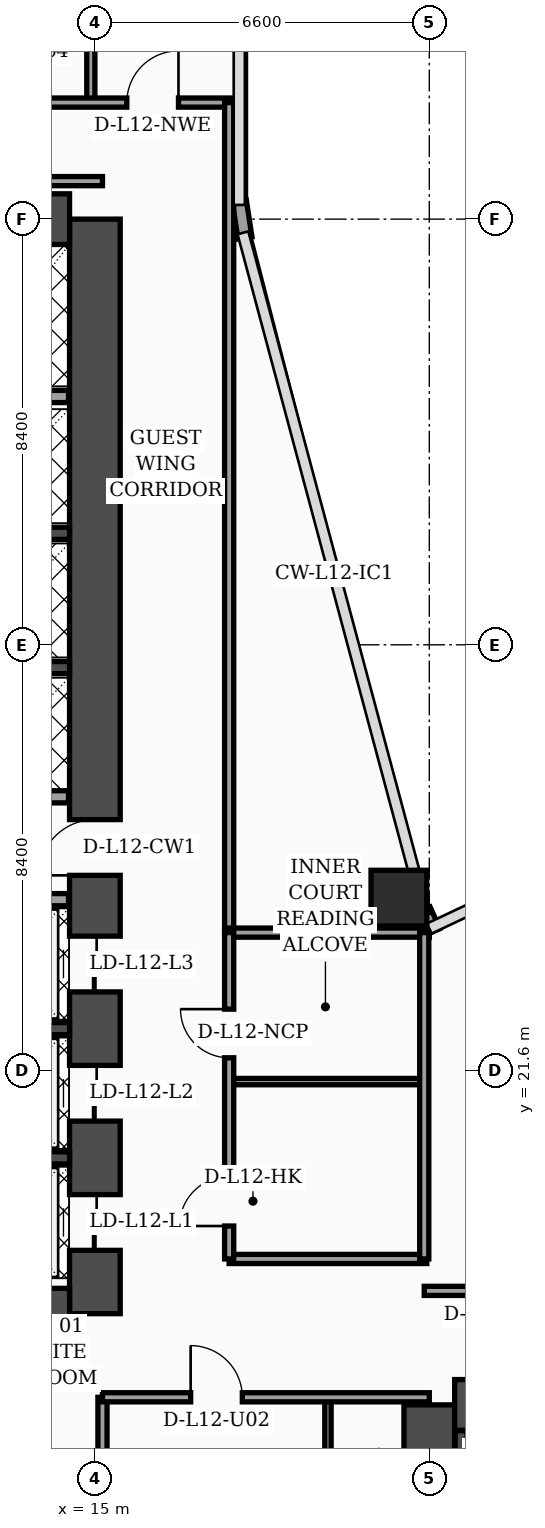
"""IFC4 building model, lengths in metres.
Left out: names, types, materials, properties, quantities, classifications, styles, units other than length and angle.
Written with IfcOpenShell. Run it as: python <this file> out.ifc"""

import sys

from ifc_helpers import new_model, si_unit, direction, frame, frame_2d, origin, origin_2d, place, context, subcontext, project, spatial, rectangle, hollow_rectangle, extrude, element, fill, save


model = new_model("IFC4")
c1 = context("Model", 3, precision=1e-05, world=origin(), true_north=direction((0.0, 1.0)))
c2 = subcontext(c1, "Body", "Model", "MODEL_VIEW")
j1 = project(units=[si_unit("LENGTHUNIT", "METRE"), si_unit("PLANEANGLEUNIT", "RADIAN")], contexts=[c1])
p1 = place(None, origin())
s1 = spatial("IfcSite", under=j1, at=p1, CompositionType="ELEMENT")
p2 = place(p1, origin())
s2 = spatial("IfcBuilding", under=s1, at=p2, CompositionType="ELEMENT")
p3 = place(p2, frame((0.0, 0.0, 54.6)))
s3 = spatial("IfcBuildingStorey", under=s2, at=p3, CompositionType="ELEMENT", Elevation=54.6)
p4 = place(p3, frame((15.0, 16.8, 0.0), z_axis=(0.0, 0.0, 1.0), x_axis=(0.0, 1.0, 0.0)))
e1 = element("IfcWall", 1, at=p4, inside=s3, PredefinedType="SHEAR", context=c2, shape_type="SweptSolid", body=[
    extrude(rectangle(XDim=21.6, YDim=1.0, at=frame_2d((10.8, 0.0))), origin(), (0.0, 0.0, 1.0), 3.56),
])
p5 = place(p4, frame((8.65, 0.0, 0.0)))
e2 = element("IfcOpeningElement", 2, at=p5, cuts=e1, PredefinedType="OPENING", context=c2, shape_type="SweptSolid", body=[
    extrude(rectangle(XDim=1.1, YDim=2.2, at=frame_2d((0.55, 1.1))), frame((0.0, 0.51, 0.0), z_axis=(0.0, -1.0, 0.0), x_axis=(1.0, 0.0, 0.0)), (0.0, 0.0, 1.0), 1.02),
])
p6 = place(p4, frame((1.25, 0.0, 0.0)))
e3 = element("IfcOpeningElement", 3, at=p6, cuts=e1, PredefinedType="OPENING", context=c2, shape_type="SweptSolid", body=[
    extrude(rectangle(XDim=1.1, YDim=2.2, at=frame_2d((0.55, 1.1))), frame((0.0, 0.51, 0.0), z_axis=(0.0, -1.0, 0.0), x_axis=(1.0, 0.0, 0.0)), (0.0, 0.0, 1.0), 1.02),
])
p7 = place(p4, frame((3.8, 0.0, 0.0)))
e4 = element("IfcOpeningElement", 4, at=p7, cuts=e1, PredefinedType="OPENING", context=c2, shape_type="SweptSolid", body=[
    extrude(rectangle(XDim=1.1, YDim=2.2, at=frame_2d((0.55, 1.1))), frame((0.0, 0.51, 0.0), z_axis=(0.0, -1.0, 0.0), x_axis=(1.0, 0.0, 0.0)), (0.0, 0.0, 1.0), 1.02),
])
p8 = place(p4, frame((6.35, 0.0, 0.0)))
e5 = element("IfcOpeningElement", 5, at=p8, cuts=e1, PredefinedType="OPENING", context=c2, shape_type="SweptSolid", body=[
    extrude(rectangle(XDim=1.1, YDim=2.2, at=frame_2d((0.55, 1.1))), frame((0.0, 0.51, 0.0), z_axis=(0.0, -1.0, 0.0), x_axis=(1.0, 0.0, 0.0)), (0.0, 0.0, 1.0), 1.02),
])
for number, where, z_axis, x_axis in (
    (6, (4.7, 38.4, 0.0), (0.0, 0.0, 1.0), (1.0, 0.0, 0.0)),
    (7, (4.7, 16.8, 0.0), (0.0, 0.0, 1.0), (1.0, 0.0, 0.0)),
):
    element("IfcWall", number, at=place(p3, frame(where, z_axis=z_axis, x_axis=x_axis)), inside=s3, PredefinedType="SHEAR", context=c2, shape_type="SweptSolid", body=[
        extrude(rectangle(XDim=9.8, YDim=1.0, at=frame_2d((4.9, 0.0))), origin(), (0.0, 0.0, 1.0), 3.56),
    ])
p9 = place(p3, frame((21.6, 4.6, 0.0), z_axis=(0.0, 0.0, 1.0), x_axis=(0.0, 1.0, 0.0)))
e8 = element("IfcWall", 8, at=p9, inside=s3, PredefinedType="SHEAR", context=c2, shape_type="SweptSolid", body=[
    extrude(rectangle(XDim=10.4, YDim=1.0, at=frame_2d((5.2, 0.0))), origin(), (0.0, 0.0, 1.0), 3.56),
])
p10 = place(p3, frame((22.1, 15.0, 0.0), z_axis=(0.0, 0.0, 1.0), x_axis=(1.0, 0.0, 0.0)))
e9 = element("IfcWall", 9, at=p10, inside=s3, PredefinedType="SHEAR", context=c2, shape_type="SweptSolid", body=[
    extrude(rectangle(XDim=9.8, YDim=1.0, at=frame_2d((4.9, 0.0))), origin(), (0.0, 0.0, 1.0), 3.56),
])
p11 = place(p10, frame((4.8, 0.0, 0.0)))
e10 = element("IfcOpeningElement", 10, at=p11, cuts=e9, PredefinedType="OPENING", context=c2, shape_type="SweptSolid", body=[
    extrude(rectangle(XDim=1.1, YDim=2.2, at=frame_2d((0.55, 1.1))), frame((0.0, 0.51, 0.0), z_axis=(0.0, -1.0, 0.0), x_axis=(1.0, 0.0, 0.0)), (0.0, 0.0, 1.0), 1.02),
])
p12 = place(p3, frame((22.23, 5.1, 0.0), z_axis=(0.0, 0.0, 1.0), x_axis=(0.0, 1.0, 0.0)))
e11 = element("IfcWall", 11, at=p12, inside=s3, PredefinedType="SOLIDWALL", context=c2, shape_type="SweptSolid", body=[
    extrude(rectangle(XDim=9.39, YDim=0.24, at=frame_2d((4.695, 0.0))), origin(), (0.0, 0.0, 1.0), 3.56),
])
for number, where, z_axis, x_axis in (
    (12, (12.18, 19.875, 0.0), (0.0, 0.0, 1.0), (1.0, 0.0, 0.0)),
    (13, (12.18, 22.425, 0.0), (0.0, 0.0, 1.0), (1.0, 0.0, 0.0)),
    (14, (12.18, 29.55, 0.0), (0.0, 0.0, 1.0), (1.0, 0.0, 0.0)),
    (15, (12.18, 32.2, 0.0), (0.0, 0.0, 1.0), (1.0, 0.0, 0.0)),
):
    element("IfcWall", number, at=place(p3, frame(where, z_axis=z_axis, x_axis=x_axis)), inside=s3, PredefinedType="SOLIDWALL", context=c2, shape_type="SweptSolid", body=[
        extrude(rectangle(XDim=2.32, YDim=0.24, at=frame_2d((1.16, 0.0))), origin(), (0.0, 0.0, 1.0), 3.56),
    ])
p13 = place(p3, frame((21.0, 25.0, 0.0), z_axis=(0.0, 0.0, 1.0), x_axis=(1.0, 0.0, 0.0)))
e16 = element("IfcColumn", 16, at=p13, inside=s3, PredefinedType="COLUMN", context=c2, shape_type="SweptSolid", body=[
    extrude(hollow_rectangle(XDim=1.1, YDim=1.1, WallThickness=0.045, at=origin_2d()), origin(), (0.0, 0.0, 1.0), 3.56),
])
p14 = place(p3, frame((21.68, 24.34, 0.0), z_axis=(0.0, 0.0, 1.0), x_axis=(-0.40758134973, 0.913168901875, 0.0)))
e17 = element("IfcWall", 17, at=p14, inside=s3, PredefinedType="SOLIDWALL", context=c2, shape_type="SweptSolid", body=[
    extrude(rectangle(XDim=0.471, YDim=0.28, at=frame_2d((0.235, 0.0))), origin(), (0.0, 0.0, 1.0), 3.56),
])
p15 = place(p3, frame((17.962, 38.03, 0.0), z_axis=(0.0, 0.0, 1.0), x_axis=(-0.15141125477, 0.988470855377, 0.0)))
e18 = element("IfcWall", 18, at=p15, inside=s3, PredefinedType="SOLIDWALL", context=c2, shape_type="SweptSolid", body=[
    extrude(rectangle(XDim=0.739, YDim=0.28, at=frame_2d((0.369, 0.0))), origin(), (0.0, 0.0, 1.0), 3.56),
])
p16 = place(p3, frame((12.15, 24.97, 0.0), z_axis=(0.0, 0.0, 1.0), x_axis=(1.0, 0.0, 0.0)))
e19 = element("IfcWall", 19, at=p16, inside=s3, PredefinedType="SOLIDWALL", context=c2, shape_type="SweptSolid", body=[
    extrude(rectangle(XDim=2.33, YDim=0.24, at=frame_2d((1.165, 0.0))), origin(), (0.0, 0.0, 1.0), 2.84),
])
p17 = place(p3, frame((12.25, 27.0, 0.0), z_axis=(0.0, 0.0, 1.0), x_axis=(1.0, 0.0, 0.0)))
e20 = element("IfcWall", 20, at=p17, inside=s3, PredefinedType="SOLIDWALL", context=c2, shape_type="SweptSolid", body=[
    extrude(rectangle(XDim=2.23, YDim=0.24, at=frame_2d((1.115, 0.0))), origin(), (0.0, 0.0, 1.0), 3.56),
])
p18 = place(p3, frame((9.66, 34.9, 0.0), z_axis=(0.0, 0.0, 1.0), x_axis=(1.0, 0.0, 0.0)))
e21 = element("IfcWall", 21, at=p18, inside=s3, PredefinedType="SOLIDWALL", context=c2, shape_type="SweptSolid", body=[
    extrude(rectangle(XDim=4.82, YDim=0.24, at=frame_2d((2.41, 0.0))), origin(), (0.0, 0.0, 1.0), 3.56),
])
p19 = place(p3, frame((15.15, 2.44, 0.0), z_axis=(0.0, 0.0, 1.0), x_axis=(0.0, 1.0, 0.0)))
e22 = element("IfcWall", 22, at=p19, inside=s3, PredefinedType="PARTITIONING", context=c2, shape_type="SweptSolid", body=[
    extrude(rectangle(XDim=12.71, YDim=0.18, at=frame_2d((6.355, 0.0))), origin(), (0.0, 0.0, 1.0), 3.04),
])
p20 = place(p3, frame((19.6, 2.44, 0.0), z_axis=(0.0, 0.0, 1.0), x_axis=(0.0, 1.0, 0.0)))
e23 = element("IfcWall", 23, at=p20, inside=s3, PredefinedType="PARTITIONING", context=c2, shape_type="SweptSolid", body=[
    extrude(rectangle(XDim=12.71, YDim=0.125, at=frame_2d((6.355, 0.0))), origin(), (0.0, 0.0, 1.0), 2.34),
])
p21 = place(p20, frame((4.34, 0.0, 0.0)))
e24 = element("IfcOpeningElement", 24, at=p21, cuts=e23, PredefinedType="OPENING", context=c2, shape_type="SweptSolid", body=[
    extrude(rectangle(XDim=0.96, YDim=2.2, at=frame_2d((0.48, 1.1))), frame((0.0, 0.073, 0.0), z_axis=(0.0, -1.0, 0.0), x_axis=(1.0, 0.0, 0.0)), (0.0, 0.0, 1.0), 0.145),
])
p22 = place(p20, frame((10.18, 0.0, 0.0)))
e25 = element("IfcOpeningElement", 25, at=p22, cuts=e23, PredefinedType="OPENING", context=c2, shape_type="SweptSolid", body=[
    extrude(rectangle(XDim=0.9, YDim=2.15, at=frame_2d((0.45, 1.075))), frame((0.0, 0.073, 0.0), z_axis=(0.0, -1.0, 0.0), x_axis=(1.0, 0.0, 0.0)), (0.0, 0.0, 1.0), 0.145),
])
p23 = place(p3, frame((15.15, 15.15, 0.0), z_axis=(0.0, 0.0, 1.0), x_axis=(1.0, 0.0, 0.0)))
e26 = element("IfcWall", 26, at=p23, inside=s3, PredefinedType="PARTITIONING", context=c2, shape_type="SweptSolid", body=[
    extrude(rectangle(XDim=6.45, YDim=0.18, at=frame_2d((3.225, 0.0))), origin(), (0.0, 0.0, 1.0), 2.34),
])
p24 = place(p23, frame((1.74, 0.0, 0.0)))
e27 = element("IfcOpeningElement", 27, at=p24, cuts=e26, PredefinedType="OPENING", context=c2, shape_type="SweptSolid", body=[
    extrude(rectangle(XDim=1.02, YDim=2.2, at=frame_2d((0.51, 1.1))), frame((0.0, 0.1, 0.0), z_axis=(0.0, -1.0, 0.0), x_axis=(1.0, 0.0, 0.0)), (0.0, 0.0, 1.0), 0.2),
])
p25 = place(p3, frame((14.92, 40.7, 0.0), z_axis=(0.0, 0.0, 1.0), x_axis=(0.0, 1.0, 0.0)))
e28 = element("IfcWall", 28, at=p25, inside=s3, PredefinedType="PARTITIONING", context=c2, shape_type="SweptSolid", body=[
    extrude(rectangle(XDim=7.1, YDim=0.16, at=frame_2d((3.55, 0.0))), origin(), (0.0, 0.0, 1.0), 3.04),
])
p26 = place(p3, frame((0.08, 40.7, 0.0), z_axis=(0.0, 0.0, 1.0), x_axis=(1.0, 0.0, 0.0)))
e29 = element("IfcWall", 29, at=p26, inside=s3, PredefinedType="PARTITIONING", context=c2, shape_type="SweptSolid", body=[
    extrude(rectangle(XDim=17.77, YDim=0.18, at=frame_2d((8.885, 0.0))), origin(), (0.0, 0.0, 1.0), 2.84),
])
p27 = place(p26, frame((0.9, 0.0, 0.0)))
e30 = element("IfcOpeningElement", 30, at=p27, cuts=e29, PredefinedType="OPENING", context=c2, shape_type="SweptSolid", body=[
    extrude(rectangle(XDim=1.02, YDim=2.2, at=frame_2d((0.51, 1.1))), frame((0.0, 0.1, 0.0), z_axis=(0.0, -1.0, 0.0), x_axis=(1.0, 0.0, 0.0)), (0.0, 0.0, 1.0), 0.2),
])
p28 = place(p26, frame((4.9, 0.0, 0.0)))
e31 = element("IfcOpeningElement", 31, at=p28, cuts=e29, PredefinedType="OPENING", context=c2, shape_type="SweptSolid", body=[
    extrude(rectangle(XDim=1.02, YDim=2.2, at=frame_2d((0.51, 1.1))), frame((0.0, 0.1, 0.0), z_axis=(0.0, -1.0, 0.0), x_axis=(1.0, 0.0, 0.0)), (0.0, 0.0, 1.0), 0.2),
])
p29 = place(p26, frame((10.78, 0.0, 0.0)))
e32 = element("IfcOpeningElement", 32, at=p29, cuts=e29, PredefinedType="OPENING", context=c2, shape_type="SweptSolid", body=[
    extrude(rectangle(XDim=1.02, YDim=2.2, at=frame_2d((0.51, 1.1))), frame((0.0, 0.1, 0.0), z_axis=(0.0, -1.0, 0.0), x_axis=(1.0, 0.0, 0.0)), (0.0, 0.0, 1.0), 0.2),
])
p30 = place(p26, frame((15.55, 0.0, 0.0)))
e33 = element("IfcOpeningElement", 33, at=p30, cuts=e29, PredefinedType="OPENING", context=c2, shape_type="SweptSolid", body=[
    extrude(rectangle(XDim=1.02, YDim=2.2, at=frame_2d((0.51, 1.1))), frame((0.0, 0.1, 0.0), z_axis=(0.0, -1.0, 0.0), x_axis=(1.0, 0.0, 0.0)), (0.0, 0.0, 1.0), 0.2),
])
p31 = place(p3, frame((17.65, 24.3, 0.0), z_axis=(0.0, 0.0, 1.0), x_axis=(0.0, 1.0, 0.0)))
e34 = element("IfcWall", 34, at=p31, inside=s3, PredefinedType="PARTITIONING", context=c2, shape_type="SweptSolid", body=[
    extrude(rectangle(XDim=16.4, YDim=0.18, at=frame_2d((8.2, 0.0))), origin(), (0.0, 0.0, 1.0), 2.84),
])
p32 = place(p3, frame((3.68, 39.15, 0.0), z_axis=(0.0, 0.0, 1.0), x_axis=(1.0, 0.0, 0.0)))
e35 = element("IfcWall", 35, at=p32, inside=s3, PredefinedType="PARTITIONING", context=c2, shape_type="SweptSolid", body=[
    extrude(rectangle(XDim=11.47, YDim=0.18, at=frame_2d((5.735, 0.0))), origin(), (0.0, 0.0, 1.0), 2.84),
])
p33 = place(p3, frame((17.65, 17.88, 0.0), z_axis=(0.0, 0.0, 1.0), x_axis=(1.0, 0.0, 0.0)))
e36 = element("IfcWall", 36, at=p33, inside=s3, PredefinedType="PARTITIONING", context=c2, shape_type="SweptSolid", body=[
    extrude(rectangle(XDim=3.9, YDim=0.18, at=frame_2d((1.95, 0.0))), origin(), (0.0, 0.0, 1.0), 3.09),
])
p34 = place(p3, frame((17.65, 21.38, 0.0), z_axis=(0.0, 0.0, 1.0), x_axis=(1.0, 0.0, 0.0)))
e37 = element("IfcWall", 37, at=p34, inside=s3, PredefinedType="PARTITIONING", context=c2, shape_type="SweptSolid", body=[
    extrude(rectangle(XDim=3.9, YDim=0.125, at=frame_2d((1.95, 0.0))), origin(), (0.0, 0.0, 1.0), 3.56),
])
p35 = place(p3, frame((17.65, 24.32, 0.0), z_axis=(0.0, 0.0, 1.0), x_axis=(1.0, 0.0, 0.0)))
e38 = element("IfcWall", 38, at=p35, inside=s3, PredefinedType="PARTITIONING", context=c2, shape_type="SweptSolid", body=[
    extrude(rectangle(XDim=3.95, YDim=0.18, at=frame_2d((1.975, 0.0))), origin(), (0.0, 0.0, 1.0), 3.56),
])
p36 = place(p3, frame((21.5, 17.88, 0.0), z_axis=(0.0, 0.0, 1.0), x_axis=(0.0, 1.0, 0.0)))
e39 = element("IfcWall", 39, at=p36, inside=s3, PredefinedType="PARTITIONING", context=c2, shape_type="SweptSolid", body=[
    extrude(rectangle(XDim=6.44, YDim=0.18, at=frame_2d((3.22, 0.0))), origin(), (0.0, 0.0, 1.0), 3.09),
])
p37 = place(p3, frame((17.65, 17.88, 0.0), z_axis=(0.0, 0.0, 1.0), x_axis=(0.0, 1.0, 0.0)))
e40 = element("IfcWall", 40, at=p37, inside=s3, PredefinedType="PARTITIONING", context=c2, shape_type="SweptSolid", body=[
    extrude(rectangle(XDim=6.44, YDim=0.18, at=frame_2d((3.22, 0.0))), origin(), (0.0, 0.0, 1.0), 3.09),
])
p38 = place(p37, frame((0.65, 0.0, 0.0)))
e41 = element("IfcOpeningElement", 41, at=p38, cuts=e40, PredefinedType="OPENING", context=c2, shape_type="SweptSolid", body=[
    extrude(rectangle(XDim=0.98, YDim=2.15, at=frame_2d((0.49, 1.075))), frame((0.0, 0.1, 0.0), z_axis=(0.0, -1.0, 0.0), x_axis=(1.0, 0.0, 0.0)), (0.0, 0.0, 1.0), 0.2),
])
p39 = place(p37, frame((3.97, 0.0, 0.0)))
e42 = element("IfcOpeningElement", 42, at=p39, cuts=e40, PredefinedType="OPENING", context=c2, shape_type="SweptSolid", body=[
    extrude(rectangle(XDim=0.96, YDim=2.2, at=frame_2d((0.48, 1.1))), frame((0.0, 0.1, 0.0), z_axis=(0.0, -1.0, 0.0), x_axis=(1.0, 0.0, 0.0)), (0.0, 0.0, 1.0), 0.2),
])
p40 = place(p3, frame((21.5, 17.25, 0.0), z_axis=(0.0, 0.0, 1.0), x_axis=(1.0, 0.0, 0.0)))
e43 = element("IfcWall", 43, at=p40, inside=s3, PredefinedType="PARTITIONING", context=c2, shape_type="SweptSolid", body=[
    extrude(rectangle(XDim=25.5, YDim=0.18, at=frame_2d((12.75, 0.0))), origin(), (0.0, 0.0, 1.0), 2.84),
])
p41 = place(p40, frame((0.95, 0.0, 0.0)))
e44 = element("IfcOpeningElement", 44, at=p41, cuts=e43, PredefinedType="OPENING", context=c2, shape_type="SweptSolid", body=[
    extrude(rectangle(XDim=1.02, YDim=2.2, at=frame_2d((0.51, 1.1))), frame((0.0, 0.1, 0.0), z_axis=(0.0, -1.0, 0.0), x_axis=(1.0, 0.0, 0.0)), (0.0, 0.0, 1.0), 0.2),
])
p42 = place(p40, frame((7.95, 0.0, 0.0)))
e45 = element("IfcOpeningElement", 45, at=p42, cuts=e43, PredefinedType="OPENING", context=c2, shape_type="SweptSolid", body=[
    extrude(rectangle(XDim=1.02, YDim=2.2, at=frame_2d((0.51, 1.1))), frame((0.0, 0.1, 0.0), z_axis=(0.0, -1.0, 0.0), x_axis=(1.0, 0.0, 0.0)), (0.0, 0.0, 1.0), 0.2),
])
p43 = place(p40, frame((13.65, 0.0, 0.0)))
e46 = element("IfcOpeningElement", 46, at=p43, cuts=e43, PredefinedType="OPENING", context=c2, shape_type="SweptSolid", body=[
    extrude(rectangle(XDim=1.02, YDim=2.2, at=frame_2d((0.51, 1.1))), frame((0.0, 0.1, 0.0), z_axis=(0.0, -1.0, 0.0), x_axis=(1.0, 0.0, 0.0)), (0.0, 0.0, 1.0), 0.2),
])
p44 = place(p40, frame((20.0, 0.0, 0.0)))
e47 = element("IfcOpeningElement", 47, at=p44, cuts=e43, PredefinedType="OPENING", context=c2, shape_type="SweptSolid", body=[
    extrude(rectangle(XDim=1.02, YDim=2.2, at=frame_2d((0.51, 1.1))), frame((0.0, 0.1, 0.0), z_axis=(0.0, -1.0, 0.0), x_axis=(1.0, 0.0, 0.0)), (0.0, 0.0, 1.0), 0.2),
])
p45 = place(p24, origin())
e48 = element("IfcDoor", 48, at=p45, inside=s3, OperationType="SINGLE_SWING_LEFT", PredefinedType="DOOR", context=c2, shape_type="SweptSolid", body=[
    extrude(rectangle(XDim=1.02, YDim=2.2, at=frame_2d((0.51, 1.1))), frame((0.0, 0.025, 0.0), z_axis=(0.0, -1.0, 0.0), x_axis=(1.0, 0.0, 0.0)), (0.0, 0.0, 1.0), 0.05),
])
fill(e27, e48)
p46 = place(p30, origin())
e49 = element("IfcDoor", 49, at=p46, inside=s3, OperationType="SINGLE_SWING_RIGHT", PredefinedType="DOOR", context=c2, shape_type="SweptSolid", body=[
    extrude(rectangle(XDim=1.02, YDim=2.2, at=frame_2d((0.51, 1.1))), frame((0.0, 0.025, 0.0), z_axis=(0.0, -1.0, 0.0), x_axis=(1.0, 0.0, 0.0)), (0.0, 0.0, 1.0), 0.05),
])
fill(e33, e49)
p47 = place(p38, origin())
e50 = element("IfcDoor", 50, at=p47, inside=s3, OperationType="SINGLE_SWING_LEFT", PredefinedType="DOOR", context=c2, shape_type="SweptSolid", body=[
    extrude(rectangle(XDim=0.98, YDim=2.15, at=frame_2d((0.49, 1.075))), frame((0.0, 0.025, 0.0), z_axis=(0.0, -1.0, 0.0), x_axis=(1.0, 0.0, 0.0)), (0.0, 0.0, 1.0), 0.05),
])
fill(e41, e50)
p48 = place(p39, origin())
e51 = element("IfcDoor", 51, at=p48, inside=s3, OperationType="SINGLE_SWING_RIGHT", PredefinedType="DOOR", context=c2, shape_type="SweptSolid", body=[
    extrude(rectangle(XDim=0.96, YDim=2.2, at=frame_2d((0.48, 1.1))), frame((0.0, 0.025, 0.0), z_axis=(0.0, -1.0, 0.0), x_axis=(1.0, 0.0, 0.0)), (0.0, 0.0, 1.0), 0.05),
])
fill(e42, e51)
p49 = place(p5, origin())
e52 = element("IfcDoor", 52, at=p49, inside=s3, OperationType="SINGLE_SWING_LEFT", PredefinedType="DOOR", context=c2, shape_type="SweptSolid", body=[
    extrude(rectangle(XDim=1.1, YDim=2.2, at=frame_2d((0.55, 1.1))), frame((0.0, 0.025, 0.0), z_axis=(0.0, -1.0, 0.0), x_axis=(1.0, 0.0, 0.0)), (0.0, 0.0, 1.0), 0.05),
])
fill(e2, e52)
p50 = place(p6, origin())
e53 = element("IfcDoor", 53, at=p50, inside=s3, OperationType="DOUBLE_DOOR_SLIDING", PredefinedType="DOOR", context=c2, shape_type="SweptSolid", body=[
    extrude(rectangle(XDim=1.1, YDim=2.2, at=frame_2d((0.55, 1.1))), frame((0.0, 0.025, 0.0), z_axis=(0.0, -1.0, 0.0), x_axis=(1.0, 0.0, 0.0)), (0.0, 0.0, 1.0), 0.05),
])
fill(e3, e53)
p51 = place(p7, origin())
e54 = element("IfcDoor", 54, at=p51, inside=s3, OperationType="DOUBLE_DOOR_SLIDING", PredefinedType="DOOR", context=c2, shape_type="SweptSolid", body=[
    extrude(rectangle(XDim=1.1, YDim=2.2, at=frame_2d((0.55, 1.1))), frame((0.0, 0.025, 0.0), z_axis=(0.0, -1.0, 0.0), x_axis=(1.0, 0.0, 0.0)), (0.0, 0.0, 1.0), 0.05),
])
fill(e4, e54)
p52 = place(p8, origin())
e55 = element("IfcDoor", 55, at=p52, inside=s3, OperationType="DOUBLE_DOOR_SLIDING", PredefinedType="DOOR", context=c2, shape_type="SweptSolid", body=[
    extrude(rectangle(XDim=1.1, YDim=2.2, at=frame_2d((0.55, 1.1))), frame((0.0, 0.025, 0.0), z_axis=(0.0, -1.0, 0.0), x_axis=(1.0, 0.0, 0.0)), (0.0, 0.0, 1.0), 0.05),
])
fill(e5, e55)
save(model, sys.argv[1])
